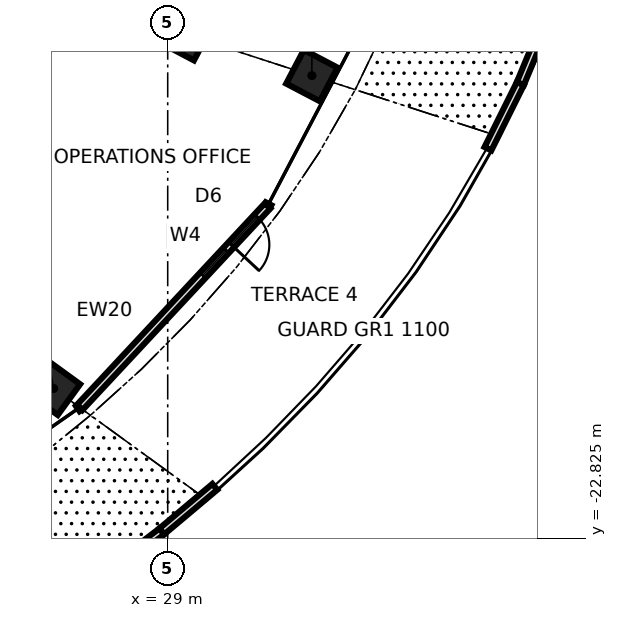
"""IFC4 building model, lengths in metres.
Left out: names, types, materials, properties, quantities, classifications, styles, units other than length and angle.
Written with IfcOpenShell. Run it as: python <this file> out.ifc"""

import sys

from ifc_helpers import new_model, si_unit, direction, frame, frame_2d, origin, origin_2d, place, context, subcontext, project, spatial, rectangle, extrude, element, fill, save


model = new_model("IFC4")
c1 = context("Model", 3, precision=1e-05, world=origin(), true_north=direction((0.0, 1.0)))
c2 = subcontext(c1, "Body", "Model", "MODEL_VIEW")
j1 = project(units=[si_unit("LENGTHUNIT", "METRE"), si_unit("PLANEANGLEUNIT", "RADIAN")], contexts=[c1])
p1 = place(None, origin())
s1 = spatial("IfcSite", under=j1, at=p1, CompositionType="ELEMENT")
p2 = place(p1, origin())
s2 = spatial("IfcBuilding", under=s1, at=p2, CompositionType="ELEMENT")
p3 = place(p2, frame((0.0, 0.0, 10.6)))
s3 = spatial("IfcBuildingStorey", under=s2, at=p3, CompositionType="ELEMENT", Elevation=10.6)
for number, where, z_axis, x_axis in (
    (1, (25.997, -18.888, 0.0), (0.0, 0.0, 1.0), (0.809, -0.588, 0.0)),
    (2, (32.794, -10.655, 0.0), (0.0, 0.0, 1.0), (0.885, -0.465, 0.0)),
    (3, (29.482, -9.579, 0.0), (0.0, 0.0, 1.0), (0.884, -0.467, 0.0)),
):
    element("IfcColumn", number, at=place(p3, frame(where, z_axis=z_axis, x_axis=x_axis)), inside=s3, PredefinedType="COLUMN", context=c2, shape_type="SweptSolid", body=[
        extrude(rectangle(XDim=1.0, YDim=1.0, at=origin_2d()), origin(), (0.0, 0.0, 1.0), 4.5),
    ])
p4 = place(p3, frame((26.684, -19.387, 0.0), z_axis=(0.0, 0.0, 1.0), x_axis=(0.681826332835, 0.731514081787, 0.0)))
e4 = element("IfcWall", 4, at=p4, inside=s3, PredefinedType="SOLIDWALL", context=c2, shape_type="SweptSolid", body=[
    extrude(rectangle(XDim=7.252, YDim=0.2, at=frame_2d((3.626, 0.0))), origin(), (0.0, 0.0, 1.0), 4.3),
])
p5 = place(p4, frame((5.852, 0.0, 0.0)))
e5 = element("IfcOpeningElement", 5, at=p5, cuts=e4, PredefinedType="OPENING", context=c2, shape_type="SweptSolid", body=[
    extrude(rectangle(XDim=1.0, YDim=2.4, at=frame_2d((0.5, 1.2))), frame((0.0, 0.11, 0.0), z_axis=(0.0, -1.0, 0.0), x_axis=(1.0, 0.0, 0.0)), (0.0, 0.0, 1.0), 0.22),
])
p6 = place(p4, frame((4.752, 0.0, 0.3)))
e6 = element("IfcOpeningElement", 6, at=p6, cuts=e4, PredefinedType="OPENING", context=c2, shape_type="SweptSolid", body=[
    extrude(rectangle(XDim=0.9, YDim=2.1, at=frame_2d((0.45, 1.05))), frame((0.0, 0.11, 0.0), z_axis=(0.0, -1.0, 0.0), x_axis=(1.0, 0.0, 0.0)), (0.0, 0.0, 1.0), 0.22),
])
p7 = place(p4, frame((5.852, 0.0, 2.7)))
e7 = element("IfcOpeningElement", 7, at=p7, cuts=e4, PredefinedType="OPENING", context=c2, shape_type="SweptSolid", body=[
    extrude(rectangle(XDim=1.0, YDim=0.6, at=frame_2d((0.5, 0.3))), frame((0.0, 0.11, 0.0), z_axis=(0.0, -1.0, 0.0), x_axis=(1.0, 0.0, 0.0)), (0.0, 0.0, 1.0), 0.22),
])
p8 = place(p3, frame((27.417, -23.742, 0.0), z_axis=(0.0, 0.0, 1.0), x_axis=(0.79419992188, 0.607656551093, 0.0)))
e8 = element("IfcWall", 8, at=p8, inside=s3, PredefinedType="PARAPET", context=c2, shape_type="SweptSolid", body=[
    extrude(rectangle(XDim=1.8, YDim=0.2, at=frame_2d((0.9, 0.0))), origin(), (0.0, 0.0, 1.0), 1.1),
])
p9 = place(p3, frame((28.846, -22.648, 0.0), z_axis=(0.0, 0.0, 1.0), x_axis=(0.765422131785, 0.643528523202, 0.0)))
e9 = element("IfcWall", 9, at=p9, inside=s3, PredefinedType="PARAPET", context=c2, shape_type="SweptSolid", body=[
    extrude(rectangle(XDim=1.821, YDim=0.2, at=frame_2d((0.91, 0.0))), origin(), (0.0, 0.0, 1.0), 1.1),
])
p10 = place(p3, frame((37.427, -12.579, 0.0), z_axis=(0.0, 0.0, 1.0), x_axis=(0.445531074881, 0.895266475032, 0.0)))
e10 = element("IfcWall", 10, at=p10, inside=s3, PredefinedType="PARAPET", context=c2, shape_type="SweptSolid", body=[
    extrude(rectangle(XDim=1.916, YDim=0.2, at=frame_2d((0.958, 0.0))), origin(), (0.0, 0.0, 1.0), 1.1),
])
p11 = place(p3, frame((38.28, -10.864, 0.0), z_axis=(0.0, 0.0, 1.0), x_axis=(0.382956922629, 0.923766201704, 0.0)))
e11 = element("IfcWall", 11, at=p11, inside=s3, PredefinedType="PARAPET", context=c2, shape_type="SweptSolid", body=[
    extrude(rectangle(XDim=1.924, YDim=0.2, at=frame_2d((0.962, 0.0))), origin(), (0.0, 0.0, 1.0), 1.1),
])
p12 = place(p3, frame((24.192, -10.771, 0.0), z_axis=(0.0, 0.0, 1.0), x_axis=(0.454462020031, 0.890766115402, 0.0)))
e12 = element("IfcWall", 12, at=p12, inside=s3, PredefinedType="PARTITIONING", context=c2, shape_type="SweptSolid", body=[
    extrude(rectangle(XDim=5.701, YDim=0.15, at=frame_2d((2.851, 0.0))), origin(), (0.0, 0.0, 1.0), 4.3),
])
p13 = place(p12, frame((2.25, 0.0, 0.0)))
e13 = element("IfcOpeningElement", 13, at=p13, cuts=e12, PredefinedType="OPENING", context=c2, shape_type="SweptSolid", body=[
    extrude(rectangle(XDim=1.2, YDim=2.4, at=frame_2d((0.6, 1.2))), frame((0.0, 0.085, 0.0), z_axis=(0.0, -1.0, 0.0), x_axis=(1.0, 0.0, 0.0)), (0.0, 0.0, 1.0), 0.17),
])
p14 = place(p5, frame((1.0, 0.0, 0.0), z_axis=(0.0, 0.0, 1.0), x_axis=(-1.0, 0.0, 0.0)))
e14 = element("IfcDoor", 14, at=p14, inside=s3, OperationType="SINGLE_SWING_RIGHT", PredefinedType="DOOR", context=c2, shape_type="SweptSolid", body=[
    extrude(rectangle(XDim=1.0, YDim=2.4, at=frame_2d((0.5, 1.2))), frame((0.0, 0.025, 0.0), z_axis=(0.0, -1.0, 0.0), x_axis=(1.0, 0.0, 0.0)), (0.0, 0.0, 1.0), 0.05),
])
fill(e5, e14)
p15 = place(p6, origin())
e15 = element("IfcWindow", 15, at=p15, inside=s3, PartitioningType="SINGLE_PANEL", PredefinedType="WINDOW", context=c2, shape_type="SweptSolid", body=[
    extrude(rectangle(XDim=0.9, YDim=2.1, at=frame_2d((0.45, 1.05))), frame((0.0, 0.03, 0.0), z_axis=(0.0, -1.0, 0.0), x_axis=(1.0, 0.0, 0.0)), (0.0, 0.0, 1.0), 0.06),
])
fill(e6, e15)
p16 = place(p7, origin())
e16 = element("IfcWindow", 16, at=p16, inside=s3, PartitioningType="SINGLE_PANEL", PredefinedType="WINDOW", context=c2, shape_type="SweptSolid", body=[
    extrude(rectangle(XDim=1.0, YDim=0.6, at=frame_2d((0.5, 0.3))), frame((0.0, 0.03, 0.0), z_axis=(0.0, -1.0, 0.0), x_axis=(1.0, 0.0, 0.0)), (0.0, 0.0, 1.0), 0.06),
])
fill(e7, e16)
save(model, sys.argv[1])
